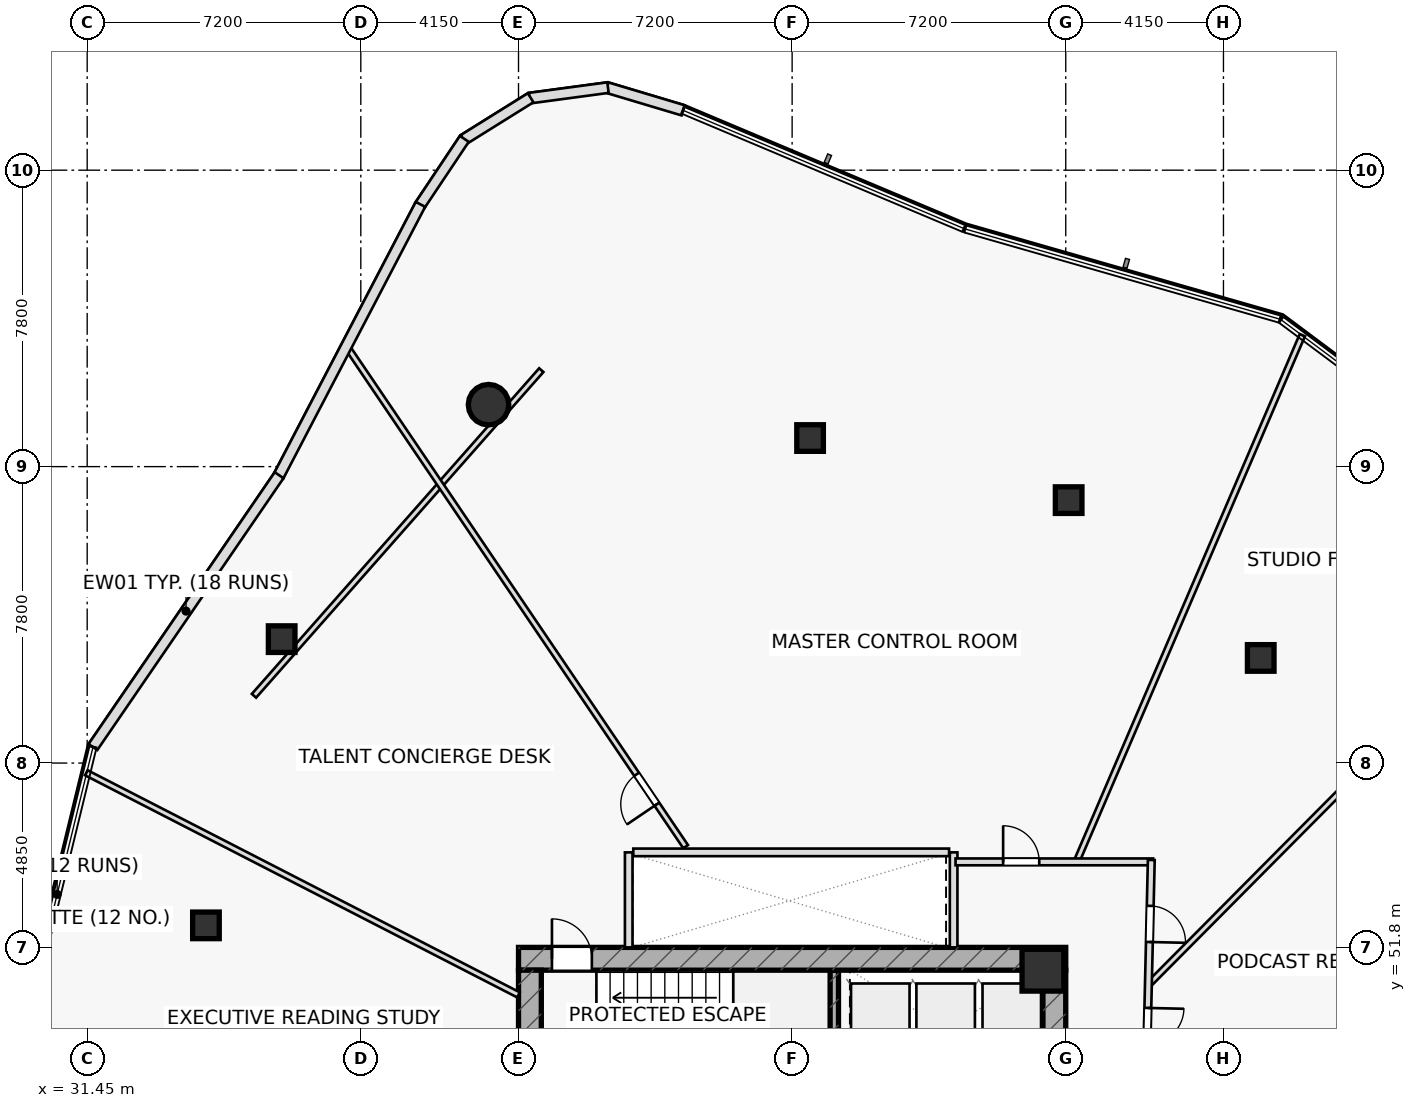
"""IFC4 building model, lengths in metres.
Left out: names, types, materials, properties, quantities, classifications, styles, units other than length and angle.
Written with IfcOpenShell. Run it as: python <this file> out.ifc"""

import sys

from ifc_helpers import new_model, si_unit, direction, frame, frame_2d, origin, origin_2d, place, context, subcontext, project, spatial, rectangle, hollow_rectangle, hollow_circle, extrude, element, fill, save


model = new_model("IFC4")
c1 = context("Model", 3, precision=1e-05, world=origin(), true_north=direction((0.0, 1.0)))
c2 = subcontext(c1, "Body", "Model", "MODEL_VIEW")
j1 = project(units=[si_unit("LENGTHUNIT", "METRE"), si_unit("PLANEANGLEUNIT", "RADIAN")], contexts=[c1])
p1 = place(None, origin())
s1 = spatial("IfcSite", under=j1, at=p1, CompositionType="ELEMENT")
p2 = place(p1, origin())
s2 = spatial("IfcBuilding", under=s1, at=p2, CompositionType="ELEMENT")
p3 = place(p2, frame((0.0, 0.0, 115.6)))
s3 = spatial("IfcBuildingStorey", under=s2, at=p3, CompositionType="ELEMENT", Elevation=115.6)
p4 = place(p3, frame((51.11, 48.1, 0.0), z_axis=(0.0, 0.0, 1.0), x_axis=(0.0, 1.0, 0.0)))
e1 = element("IfcWall", 1, at=p4, inside=s3, PredefinedType="SHEAR", context=c2, shape_type="SweptSolid", body=[
    extrude(rectangle(XDim=3.1, YDim=0.22, at=frame_2d((1.55, 0.0))), origin(), (0.0, 0.0, 1.0), 3.55),
])
p5 = place(p3, frame((42.8, 51.5, 0.0), z_axis=(0.0, 0.0, 1.0), x_axis=(1.0, 0.0, 0.0)))
e2 = element("IfcWall", 2, at=p5, inside=s3, PredefinedType="SHEAR", context=c2, shape_type="SweptSolid", body=[
    extrude(rectangle(XDim=14.4, YDim=0.6, at=frame_2d((7.2, 0.0))), origin(), (0.0, 0.0, 1.0), 3.55),
])
p6 = place(p5, frame((0.88, 0.0, 0.0)))
e3 = element("IfcOpeningElement", 3, at=p6, cuts=e2, PredefinedType="OPENING", context=c2, shape_type="SweptSolid", body=[
    extrude(rectangle(XDim=1.05, YDim=2.2, at=frame_2d((0.525, 1.1))), frame((0.0, 0.31, 0.0), z_axis=(0.0, -1.0, 0.0), x_axis=(1.0, 0.0, 0.0)), (0.0, 0.0, 1.0), 0.62),
])
p7 = place(p3, frame((43.1, 38.8, 0.0), z_axis=(0.0, 0.0, 1.0), x_axis=(0.0, 1.0, 0.0)))
e4 = element("IfcWall", 4, at=p7, inside=s3, PredefinedType="SHEAR", context=c2, shape_type="SweptSolid", body=[
    extrude(rectangle(XDim=12.4, YDim=0.6, at=frame_2d((6.2, 0.0))), origin(), (0.0, 0.0, 1.0), 3.55),
])
p8 = place(p3, frame((56.9, 38.8, 0.0), z_axis=(0.0, 0.0, 1.0), x_axis=(0.0, 1.0, 0.0)))
e5 = element("IfcWall", 5, at=p8, inside=s3, PredefinedType="SHEAR", context=c2, shape_type="SweptSolid", body=[
    extrude(rectangle(XDim=12.4, YDim=0.6, at=frame_2d((6.2, 0.0))), origin(), (0.0, 0.0, 1.0), 3.55),
])
p9 = place(p8, frame((3.85, 0.0, 0.0)))
e6 = element("IfcOpeningElement", 6, at=p9, cuts=e5, PredefinedType="OPENING", context=c2, shape_type="SweptSolid", body=[
    extrude(rectangle(XDim=1.5, YDim=2.2, at=frame_2d((0.75, 1.1))), frame((0.0, 0.31, 0.0), z_axis=(0.0, -1.0, 0.0), x_axis=(1.0, 0.0, 0.0)), (0.0, 0.0, 1.0), 0.62),
])
p10 = place(p3, frame((56.6, 51.2, 0.0), z_axis=(0.0, 0.0, 1.0), x_axis=(1.0, 0.0, 0.0)))
e7 = element("IfcColumn", 7, at=p10, inside=s3, PredefinedType="COLUMN", context=c2, shape_type="SweptSolid", body=[
    extrude(rectangle(XDim=1.1, YDim=1.1, at=origin_2d()), origin(), (0.0, 0.0, 1.0), 3.55),
])
p11 = place(p3, frame((42.011, 66.08, 0.0), z_axis=(0.0, 0.0, 1.0), x_axis=(1.0, 0.0, 0.0)))
e8 = element("IfcColumn", 8, at=p11, inside=s3, PredefinedType="COLUMN", context=c2, shape_type="SweptSolid", body=[
    extrude(hollow_circle(Radius=0.533, WallThickness=0.045, at=origin_2d()), origin(), (0.0, 0.0, 1.0), 3.55),
])
for number, where, z_axis, x_axis in (
    (9, (36.568, 59.911, 0.0), (0.0, 0.0, 1.0), (1.0, 0.0, 0.0)),
    (10, (34.575, 52.379, 0.0), (0.0, 0.0, 1.0), (1.0, 0.0, 0.0)),
    (11, (62.331, 59.416, 0.0), (0.0, 0.0, 1.0), (1.0, 0.0, 0.0)),
    (12, (57.277, 63.568, 0.0), (0.0, 0.0, 1.0), (1.0, 0.0, 0.0)),
    (13, (50.472, 65.202, 0.0), (0.0, 0.0, 1.0), (1.0, 0.0, 0.0)),
):
    element("IfcColumn", number, at=place(p3, frame(where, z_axis=z_axis, x_axis=x_axis)), inside=s3, PredefinedType="COLUMN", context=c2, shape_type="SweptSolid", body=[
        extrude(hollow_rectangle(XDim=0.7, YDim=0.7, WallThickness=0.04, at=origin_2d()), origin(), (0.0, 0.0, 1.0), 3.55),
    ])
for number, where, z_axis, x_axis in (
    (14, (45.7, 51.8, 0.0), (0.0, 0.0, 1.0), (0.0, 1.0, 0.0)),
    (15, (54.25, 51.8, 0.0), (0.0, 0.0, 1.0), (0.0, 1.0, 0.0)),
):
    element("IfcWall", number, at=place(p3, frame(where, z_axis=z_axis, x_axis=x_axis)), inside=s3, PredefinedType="PARTITIONING", context=c2, shape_type="SweptSolid", body=[
        extrude(rectangle(XDim=2.5, YDim=0.2, at=frame_2d((1.25, 0.0))), origin(), (0.0, 0.0, 1.0), 3.55),
    ])
p12 = place(p3, frame((43.4, 66.989, 0.0), z_axis=(0.0, 0.0, 1.0), x_axis=(-0.661622343701, -0.749837231881, 0.0)))
e16 = element("IfcWall", 16, at=p12, inside=s3, PredefinedType="PARTITIONING", context=c2, shape_type="SweptSolid", body=[
    extrude(rectangle(XDim=11.427, YDim=0.15, at=frame_2d((5.714, 0.0))), origin(), (0.0, 0.0, 1.0), 2.835),
])
p13 = place(p3, frame((62.65, 47.055, 0.0), z_axis=(0.0, 0.0, 1.0), x_axis=(0.975173795811, 0.22144089045, 0.0)))
e17 = element("IfcWall", 17, at=p13, inside=s3, PredefinedType="PARTITIONING", context=c2, shape_type="SweptSolid", body=[
    extrude(rectangle(XDim=16.337, YDim=0.15, at=frame_2d((8.168, 0.0))), origin(), (0.0, 0.0, 1.0), 2.975),
])
p14 = place(p3, frame((59.375, 50.816, 0.0), z_axis=(0.0, 0.0, 1.0), x_axis=(0.704599563608, 0.709605140176, 0.0)))
e18 = element("IfcWall", 18, at=p14, inside=s3, PredefinedType="PARTITIONING", context=c2, shape_type="SweptSolid", body=[
    extrude(rectangle(XDim=16.047, YDim=0.15, at=frame_2d((8.023, 0.0))), origin(), (0.0, 0.0, 1.0), 2.835),
])
p15 = place(p3, frame((57.482, 54.05, 0.0), z_axis=(0.0, 0.0, 1.0), x_axis=(0.394188925316, 0.919029428886, 0.0)))
e19 = element("IfcWall", 19, at=p15, inside=s3, PredefinedType="PARTITIONING", context=c2, shape_type="SweptSolid", body=[
    extrude(rectangle(XDim=15.08, YDim=0.15, at=frame_2d((7.54, 0.0))), origin(), (0.0, 0.0, 1.0), 2.975),
])
p16 = place(p3, frame((47.198, 54.45, 0.0), z_axis=(0.0, 0.0, 1.0), x_axis=(-0.560884082232, 0.827894344889, 0.0)))
e20 = element("IfcWall", 20, at=p16, inside=s3, PredefinedType="PARTITIONING", context=c2, shape_type="SweptSolid", body=[
    extrude(rectangle(XDim=15.922, YDim=0.15, at=frame_2d((7.961, 0.0))), origin(), (0.0, 0.0, 1.0), 2.835),
])
p17 = place(p16, frame((1.35, 0.0, 0.0)))
e21 = element("IfcOpeningElement", 21, at=p17, cuts=e20, PredefinedType="OPENING", context=c2, shape_type="SweptSolid", body=[
    extrude(rectangle(XDim=0.95, YDim=2.05, at=frame_2d((0.475, 1.025))), frame((0.0, 0.085, 0.0), z_axis=(0.0, -1.0, 0.0), x_axis=(1.0, 0.0, 0.0)), (0.0, 0.0, 1.0), 0.17),
])
p18 = place(p3, frame((42.8, 50.55, 0.0), z_axis=(0.0, 0.0, 1.0), x_axis=(-0.889423329843, 0.457084390819, 0.0)))
e22 = element("IfcWall", 22, at=p18, inside=s3, PredefinedType="PARTITIONING", context=c2, shape_type="SweptSolid", body=[
    extrude(rectangle(XDim=12.786, YDim=0.15, at=frame_2d((6.393, 0.0))), origin(), (0.0, 0.0, 1.0), 2.835),
])
p19 = place(p3, frame((54.3, 54.05, 0.0), z_axis=(0.0, 0.0, 1.0), x_axis=(1.0, 0.0, 0.0)))
e23 = element("IfcWall", 23, at=p19, inside=s3, PredefinedType="PARTITIONING", context=c2, shape_type="SweptSolid", body=[
    extrude(rectangle(XDim=5.2, YDim=0.18, at=frame_2d((2.6, 0.0))), origin(), (0.0, 0.0, 1.0), 2.835),
])
p20 = place(p19, frame((1.252, 0.0, 0.0)))
e24 = element("IfcOpeningElement", 24, at=p20, cuts=e23, PredefinedType="OPENING", context=c2, shape_type="SweptSolid", body=[
    extrude(rectangle(XDim=0.95, YDim=2.05, at=frame_2d((0.475, 1.025))), frame((0.0, 0.1, 0.0), z_axis=(0.0, -1.0, 0.0), x_axis=(1.0, 0.0, 0.0)), (0.0, 0.0, 1.0), 0.2),
])
p21 = place(p3, frame((59.451, 54.1, 0.0), z_axis=(0.0, 0.0, 1.0), x_axis=(-0.023271046154, -0.999729192537, 0.0)))
e25 = element("IfcWall", 25, at=p21, inside=s3, PredefinedType="PARTITIONING", context=c2, shape_type="SweptSolid", body=[
    extrude(rectangle(XDim=5.802, YDim=0.18, at=frame_2d((2.901, 0.0))), origin(), (0.0, 0.0, 1.0), 2.835),
])
p22 = place(p21, frame((1.208, 0.0, 0.0)))
e26 = element("IfcOpeningElement", 26, at=p22, cuts=e25, PredefinedType="OPENING", context=c2, shape_type="SweptSolid", body=[
    extrude(rectangle(XDim=0.95, YDim=2.05, at=frame_2d((0.475, 1.025))), frame((0.0, 0.1, 0.0), z_axis=(0.0, -1.0, 0.0), x_axis=(1.0, 0.0, 0.0)), (0.0, 0.0, 1.0), 0.2),
])
p23 = place(p21, frame((3.894, 0.0, 0.0)))
e27 = element("IfcOpeningElement", 27, at=p23, cuts=e25, PredefinedType="OPENING", context=c2, shape_type="SweptSolid", body=[
    extrude(rectangle(XDim=0.95, YDim=2.05, at=frame_2d((0.475, 1.025))), frame((0.0, 0.1, 0.0), z_axis=(0.0, -1.0, 0.0), x_axis=(1.0, 0.0, 0.0)), (0.0, 0.0, 1.0), 0.2),
])
p24 = place(p3, frame((47.131, 73.825, 0.0), z_axis=(0.0, 0.0, 1.0), x_axis=(-0.958057109421, 0.286577345733, 0.0)))
e28 = element("IfcWall", 28, at=p24, inside=s3, PredefinedType="STANDARD", context=c2, shape_type="SweptSolid", body=[
    extrude(rectangle(XDim=2.093, YDim=0.28, at=frame_2d((1.047, 0.0))), origin(), (0.0, 0.0, 1.0), 3.55),
])
for number, where, z_axis, x_axis in (
    (29, (45.154, 74.422, 0.0), (0.0, 0.0, 1.0), (-0.991, -0.133, 0.0)),
    (30, (43.119, 74.155, 0.0), (0.0, 0.0, 1.0), (-0.848, -0.529, 0.0)),
):
    element("IfcWall", number, at=place(p3, frame(where, z_axis=z_axis, x_axis=x_axis)), inside=s3, PredefinedType="STANDARD", context=c2, shape_type="SweptSolid", body=[
        extrude(rectangle(XDim=2.082, YDim=0.28, at=frame_2d((1.041, 0.0))), origin(), (0.0, 0.0, 1.0), 3.55),
    ])
p25 = place(p3, frame((41.374, 73.074, 0.0), z_axis=(0.0, 0.0, 1.0), x_axis=(-0.555556746899, -0.831478623282, 0.0)))
e31 = element("IfcWall", 31, at=p25, inside=s3, PredefinedType="STANDARD", context=c2, shape_type="SweptSolid", body=[
    extrude(rectangle(XDim=2.104, YDim=0.28, at=frame_2d((1.052, 0.0))), origin(), (0.0, 0.0, 1.0), 3.55),
])
p26 = place(p3, frame((40.22, 71.351, 0.0), z_axis=(0.0, 0.0, 1.0), x_axis=(-0.462914452977, -0.886402960975, 0.0)))
e32 = element("IfcWall", 32, at=p26, inside=s3, PredefinedType="STANDARD", context=c2, shape_type="SweptSolid", body=[
    extrude(rectangle(XDim=8.069, YDim=0.28, at=frame_2d((4.034, 0.0))), origin(), (0.0, 0.0, 1.0), 3.55),
])
p27 = place(p3, frame((36.5, 64.224, 0.0), z_axis=(0.0, 0.0, 1.0), x_axis=(-0.56512603043, -0.825004587703, 0.0)))
e33 = element("IfcWall", 33, at=p27, inside=s3, PredefinedType="STANDARD", context=c2, shape_type="SweptSolid", body=[
    extrude(rectangle(XDim=8.669, YDim=0.28, at=frame_2d((4.334, 0.0))), origin(), (0.0, 0.0, 1.0), 3.55),
])
p28 = place(p3, frame((45.82, 54.3, 0.0), z_axis=(0.0, 0.0, 1.0), x_axis=(1.0, 0.0, 0.0)))
e34 = element("IfcWall", 34, at=p28, inside=s3, PredefinedType="PARTITIONING", context=c2, shape_type="SweptSolid", body=[
    extrude(rectangle(XDim=8.31, YDim=0.2, at=frame_2d((4.155, 0.0))), origin(), (0.0, 0.0, 1.0), 3.55),
])
p29 = place(p6, origin())
e35 = element("IfcDoor", 35, at=p29, inside=s3, OperationType="SINGLE_SWING_LEFT", PredefinedType="DOOR", context=c2, shape_type="SweptSolid", body=[
    extrude(rectangle(XDim=1.05, YDim=2.2, at=frame_2d((0.525, 1.1))), frame((0.0, 0.025, 0.0), z_axis=(0.0, -1.0, 0.0), x_axis=(1.0, 0.0, 0.0)), (0.0, 0.0, 1.0), 0.05),
])
fill(e3, e35)
p30 = place(p17, origin())
e36 = element("IfcDoor", 36, at=p30, inside=s3, OperationType="SINGLE_SWING_LEFT", PredefinedType="DOOR", context=c2, shape_type="SweptSolid", body=[
    extrude(rectangle(XDim=0.95, YDim=2.05, at=frame_2d((0.475, 1.025))), frame((0.0, 0.025, 0.0), z_axis=(0.0, -1.0, 0.0), x_axis=(1.0, 0.0, 0.0)), (0.0, 0.0, 1.0), 0.05),
])
fill(e21, e36)
p31 = place(p20, origin())
e37 = element("IfcDoor", 37, at=p31, inside=s3, OperationType="SINGLE_SWING_LEFT", PredefinedType="DOOR", context=c2, shape_type="SweptSolid", body=[
    extrude(rectangle(XDim=0.95, YDim=2.05, at=frame_2d((0.475, 1.025))), frame((0.0, 0.025, 0.0), z_axis=(0.0, -1.0, 0.0), x_axis=(1.0, 0.0, 0.0)), (0.0, 0.0, 1.0), 0.05),
])
fill(e24, e37)
p32 = place(p22, origin())
e38 = element("IfcDoor", 38, at=p32, inside=s3, OperationType="SINGLE_SWING_RIGHT", PredefinedType="DOOR", context=c2, shape_type="SweptSolid", body=[
    extrude(rectangle(XDim=0.95, YDim=2.05, at=frame_2d((0.475, 1.025))), frame((0.0, 0.025, 0.0), z_axis=(0.0, -1.0, 0.0), x_axis=(1.0, 0.0, 0.0)), (0.0, 0.0, 1.0), 0.05),
])
fill(e26, e38)
p33 = place(p23, origin())
e39 = element("IfcDoor", 39, at=p33, inside=s3, OperationType="SINGLE_SWING_LEFT", PredefinedType="DOOR", context=c2, shape_type="SweptSolid", body=[
    extrude(rectangle(XDim=0.95, YDim=2.05, at=frame_2d((0.475, 1.025))), frame((0.0, 0.025, 0.0), z_axis=(0.0, -1.0, 0.0), x_axis=(1.0, 0.0, 0.0)), (0.0, 0.0, 1.0), 0.05),
])
fill(e27, e39)
save(model, sys.argv[1])
